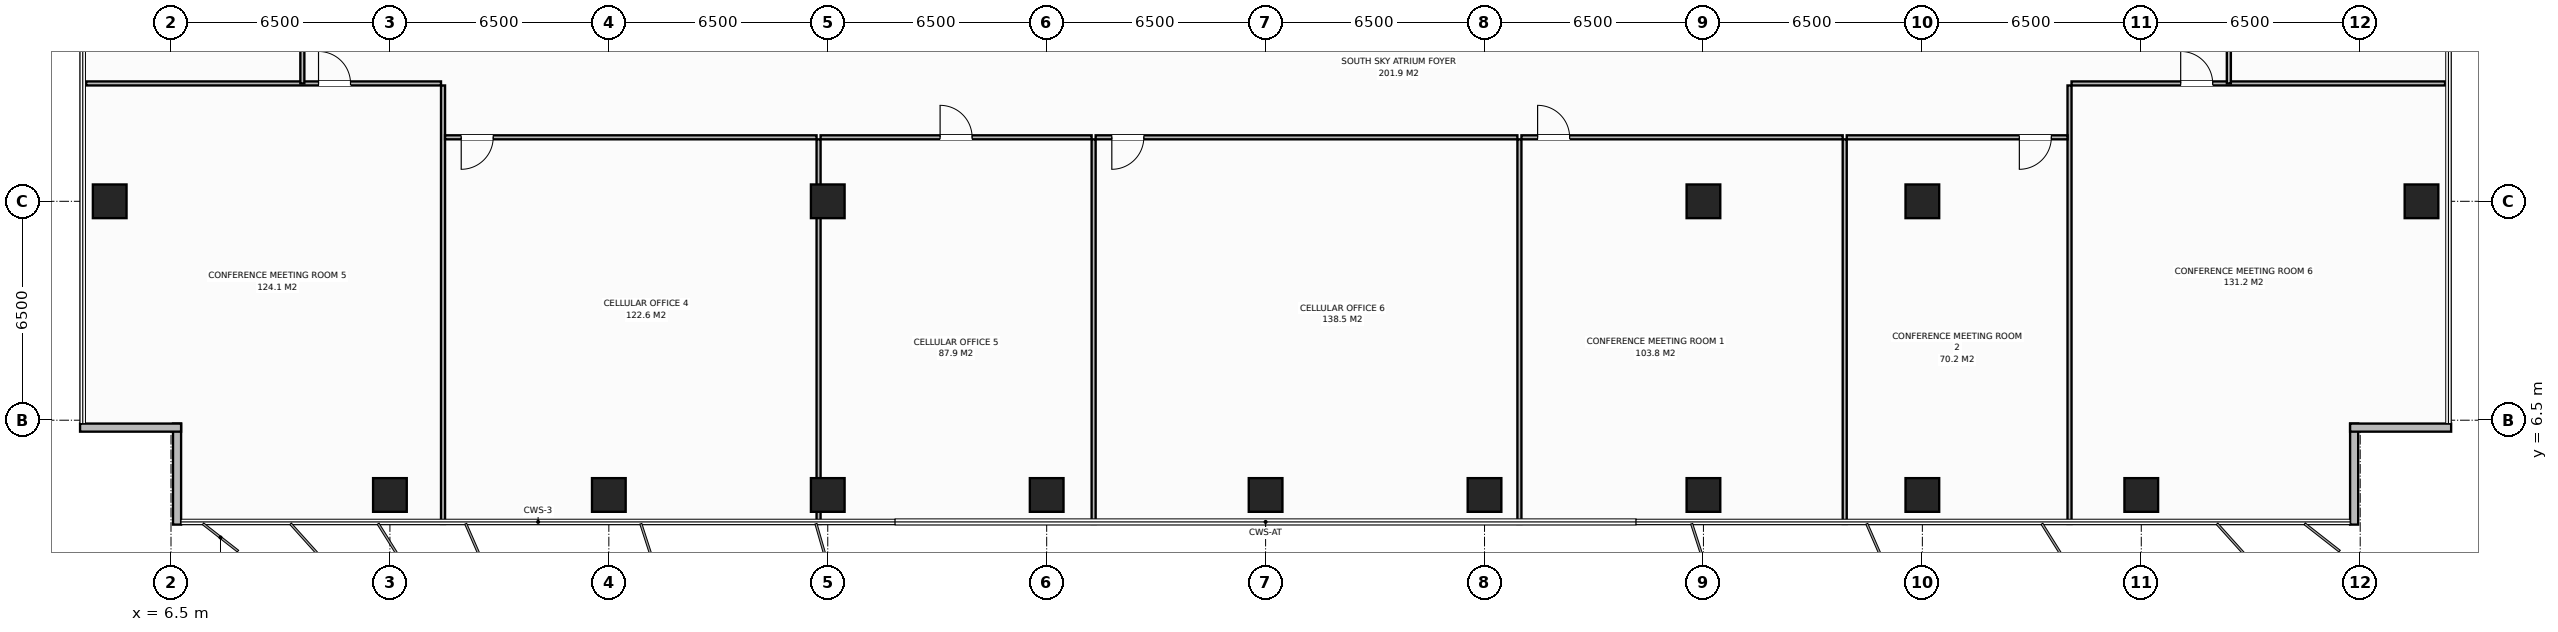
"""IFC4 building model, lengths in metres.
Left out: names, types, materials, properties, quantities, classifications, styles, units other than length and angle.
Written with IfcOpenShell. Run it as: python <this file> out.ifc"""

import sys

from ifc_helpers import new_model, si_unit, direction, frame, frame_2d, origin, origin_2d, place, context, subcontext, project, spatial, rectangle, extrude, element, fill, save


model = new_model("IFC4")
c1 = context("Model", 3, precision=1e-05, world=origin(), true_north=direction((0.0, 1.0)))
c2 = subcontext(c1, "Body", "Model", "MODEL_VIEW")
j1 = project(units=[si_unit("LENGTHUNIT", "METRE"), si_unit("PLANEANGLEUNIT", "RADIAN")], contexts=[c1])
p1 = place(None, origin())
s1 = spatial("IfcSite", under=j1, at=p1, CompositionType="ELEMENT")
p2 = place(p1, origin())
s2 = spatial("IfcBuilding", under=s1, at=p2, CompositionType="ELEMENT")
p3 = place(p2, frame((0.0, 0.0, 189.8)))
s3 = spatial("IfcBuildingStorey", under=s2, at=p3, CompositionType="ELEMENT", Elevation=189.8)
for number, where, z_axis, x_axis in (
    (1, (58.5, 13.0, 0.0), (0.0, 0.0, 1.0), (1.0, 0.0, 0.0)),
    (2, (26.0, 13.0, 0.0), (0.0, 0.0, 1.0), (1.0, 0.0, 0.0)),
    (3, (52.0, 13.0, 0.0), (0.0, 0.0, 1.0), (1.0, 0.0, 0.0)),
    (4, (13.0, 4.28, 0.0), (0.0, 0.0, 1.0), (1.0, 0.0, 0.0)),
    (5, (19.5, 4.28, 0.0), (0.0, 0.0, 1.0), (1.0, 0.0, 0.0)),
    (6, (26.0, 4.28, 0.0), (0.0, 0.0, 1.0), (1.0, 0.0, 0.0)),
    (7, (32.5, 4.28, 0.0), (0.0, 0.0, 1.0), (1.0, 0.0, 0.0)),
    (8, (39.0, 4.28, 0.0), (0.0, 0.0, 1.0), (1.0, 0.0, 0.0)),
    (9, (45.5, 4.28, 0.0), (0.0, 0.0, 1.0), (1.0, 0.0, 0.0)),
    (10, (52.0, 4.28, 0.0), (0.0, 0.0, 1.0), (1.0, 0.0, 0.0)),
    (11, (58.5, 4.28, 0.0), (0.0, 0.0, 1.0), (1.0, 0.0, 0.0)),
    (12, (65.0, 4.28, 0.0), (0.0, 0.0, 1.0), (1.0, 0.0, 0.0)),
    (13, (4.68, 13.0, 0.0), (0.0, 0.0, 1.0), (1.0, 0.0, 0.0)),
    (14, (73.32, 13.0, 0.0), (0.0, 0.0, 1.0), (1.0, 0.0, 0.0)),
):
    element("IfcColumn", number, at=place(p3, frame(where, z_axis=z_axis, x_axis=x_axis)), inside=s3, PredefinedType="COLUMN", context=c2, shape_type="SweptSolid", body=[
        extrude(rectangle(XDim=1.0, YDim=1.0, at=origin_2d()), origin(), (0.0, 0.0, 1.0), 3.8),
    ])
for number, where, z_axis, x_axis in (
    (15, (6.68, 3.4, 0.0), (0.0, 0.0, 1.0), (0.0, 1.0, 0.0)),
    (16, (6.8, 6.28, 0.0), (0.0, 0.0, 1.0), (-1.0, 0.0, 0.0)),
    (17, (71.32, 6.4, 0.0), (0.0, 0.0, 1.0), (0.0, -1.0, 0.0)),
    (18, (74.2, 6.28, 0.0), (0.0, 0.0, 1.0), (-1.0, 0.0, 0.0)),
):
    element("IfcWall", number, at=place(p3, frame(where, z_axis=z_axis, x_axis=x_axis)), inside=s3, PredefinedType="STANDARD", context=c2, shape_type="SweptSolid", body=[
        extrude(rectangle(XDim=3.0, YDim=0.24, at=frame_2d((1.5, 0.0))), origin(), (0.0, 0.0, 1.0), 3.572),
    ])
p4 = place(p3, frame((14.577, 3.42, 0.0), z_axis=(0.0, 0.0, 1.0), x_axis=(0.0, 1.0, 0.0)))
e19 = element("IfcWall", 19, at=p4, inside=s3, PredefinedType="PARTITIONING", context=c2, shape_type="SweptSolid", body=[
    extrude(rectangle(XDim=13.02, YDim=0.12, at=frame_2d((6.51, 0.0))), origin(), (0.0, 0.0, 1.0), 3.572),
])
p5 = place(p3, frame((3.98, 16.5, 0.0), z_axis=(0.0, 0.0, 1.0), x_axis=(1.0, 0.0, 0.0)))
e20 = element("IfcWall", 20, at=p5, inside=s3, PredefinedType="PARTITIONING", context=c2, shape_type="SweptSolid", body=[
    extrude(rectangle(XDim=10.537, YDim=0.12, at=frame_2d((5.269, 0.0))), origin(), (0.0, 0.0, 1.0), 3.572),
])
p6 = place(p5, frame((6.9, 0.0, 0.0)))
e21 = element("IfcOpeningElement", 21, at=p6, cuts=e20, PredefinedType="OPENING", context=c2, shape_type="SweptSolid", body=[
    extrude(rectangle(XDim=0.95, YDim=2.15, at=frame_2d((0.475, 1.075))), frame((0.0, 0.07, 0.0), z_axis=(0.0, -1.0, 0.0), x_axis=(1.0, 0.0, 0.0)), (0.0, 0.0, 1.0), 0.14),
])
p7 = place(p3, frame((25.727, 3.42, 0.0), z_axis=(0.0, 0.0, 1.0), x_axis=(0.0, 1.0, 0.0)))
e22 = element("IfcWall", 22, at=p7, inside=s3, PredefinedType="PARTITIONING", context=c2, shape_type="SweptSolid", body=[
    extrude(rectangle(XDim=11.42, YDim=0.12, at=frame_2d((5.71, 0.0))), origin(), (0.0, 0.0, 1.0), 3.572),
])
p8 = place(p3, frame((14.637, 14.9, 0.0), z_axis=(0.0, 0.0, 1.0), x_axis=(1.0, 0.0, 0.0)))
e23 = element("IfcWall", 23, at=p8, inside=s3, PredefinedType="PARTITIONING", context=c2, shape_type="SweptSolid", body=[
    extrude(rectangle(XDim=11.03, YDim=0.12, at=frame_2d((5.515, 0.0))), origin(), (0.0, 0.0, 1.0), 3.572),
])
p9 = place(p8, frame((0.48, 0.0, 0.0)))
e24 = element("IfcOpeningElement", 24, at=p9, cuts=e23, PredefinedType="OPENING", context=c2, shape_type="SweptSolid", body=[
    extrude(rectangle(XDim=0.95, YDim=2.15, at=frame_2d((0.475, 1.075))), frame((0.0, 0.07, 0.0), z_axis=(0.0, -1.0, 0.0), x_axis=(1.0, 0.0, 0.0)), (0.0, 0.0, 1.0), 0.14),
])
p10 = place(p3, frame((33.894, 3.42, 0.0), z_axis=(0.0, 0.0, 1.0), x_axis=(0.0, 1.0, 0.0)))
e25 = element("IfcWall", 25, at=p10, inside=s3, PredefinedType="PARTITIONING", context=c2, shape_type="SweptSolid", body=[
    extrude(rectangle(XDim=11.42, YDim=0.12, at=frame_2d((5.71, 0.0))), origin(), (0.0, 0.0, 1.0), 3.572),
])
p11 = place(p3, frame((25.787, 14.9, 0.0), z_axis=(0.0, 0.0, 1.0), x_axis=(1.0, 0.0, 0.0)))
e26 = element("IfcWall", 26, at=p11, inside=s3, PredefinedType="PARTITIONING", context=c2, shape_type="SweptSolid", body=[
    extrude(rectangle(XDim=8.047, YDim=0.12, at=frame_2d((4.023, 0.0))), origin(), (0.0, 0.0, 1.0), 3.572),
])
p12 = place(p11, frame((3.548, 0.0, 0.0)))
e27 = element("IfcOpeningElement", 27, at=p12, cuts=e26, PredefinedType="OPENING", context=c2, shape_type="SweptSolid", body=[
    extrude(rectangle(XDim=0.95, YDim=2.15, at=frame_2d((0.475, 1.075))), frame((0.0, 0.07, 0.0), z_axis=(0.0, -1.0, 0.0), x_axis=(1.0, 0.0, 0.0)), (0.0, 0.0, 1.0), 0.14),
])
p13 = place(p3, frame((46.536, 3.42, 0.0), z_axis=(0.0, 0.0, 1.0), x_axis=(0.0, 1.0, 0.0)))
e28 = element("IfcWall", 28, at=p13, inside=s3, PredefinedType="PARTITIONING", context=c2, shape_type="SweptSolid", body=[
    extrude(rectangle(XDim=11.42, YDim=0.12, at=frame_2d((5.71, 0.0))), origin(), (0.0, 0.0, 1.0), 3.572),
])
p14 = place(p3, frame((33.954, 14.9, 0.0), z_axis=(0.0, 0.0, 1.0), x_axis=(1.0, 0.0, 0.0)))
e29 = element("IfcWall", 29, at=p14, inside=s3, PredefinedType="PARTITIONING", context=c2, shape_type="SweptSolid", body=[
    extrude(rectangle(XDim=12.522, YDim=0.12, at=frame_2d((6.261, 0.0))), origin(), (0.0, 0.0, 1.0), 3.572),
])
p15 = place(p14, frame((0.48, 0.0, 0.0)))
e30 = element("IfcOpeningElement", 30, at=p15, cuts=e29, PredefinedType="OPENING", context=c2, shape_type="SweptSolid", body=[
    extrude(rectangle(XDim=0.95, YDim=2.15, at=frame_2d((0.475, 1.075))), frame((0.0, 0.07, 0.0), z_axis=(0.0, -1.0, 0.0), x_axis=(1.0, 0.0, 0.0)), (0.0, 0.0, 1.0), 0.14),
])
p16 = place(p3, frame((56.195, 3.42, 0.0), z_axis=(0.0, 0.0, 1.0), x_axis=(0.0, 1.0, 0.0)))
e31 = element("IfcWall", 31, at=p16, inside=s3, PredefinedType="PARTITIONING", context=c2, shape_type="SweptSolid", body=[
    extrude(rectangle(XDim=11.42, YDim=0.12, at=frame_2d((5.71, 0.0))), origin(), (0.0, 0.0, 1.0), 3.572),
])
p17 = place(p3, frame((46.596, 14.9, 0.0), z_axis=(0.0, 0.0, 1.0), x_axis=(1.0, 0.0, 0.0)))
e32 = element("IfcWall", 32, at=p17, inside=s3, PredefinedType="PARTITIONING", context=c2, shape_type="SweptSolid", body=[
    extrude(rectangle(XDim=9.539, YDim=0.12, at=frame_2d((4.769, 0.0))), origin(), (0.0, 0.0, 1.0), 3.572),
])
p18 = place(p17, frame((0.48, 0.0, 0.0)))
e33 = element("IfcOpeningElement", 33, at=p18, cuts=e32, PredefinedType="OPENING", context=c2, shape_type="SweptSolid", body=[
    extrude(rectangle(XDim=0.95, YDim=2.15, at=frame_2d((0.475, 1.075))), frame((0.0, 0.07, 0.0), z_axis=(0.0, -1.0, 0.0), x_axis=(1.0, 0.0, 0.0)), (0.0, 0.0, 1.0), 0.14),
])
p19 = place(p3, frame((62.87, 3.42, 0.0), z_axis=(0.0, 0.0, 1.0), x_axis=(0.0, 1.0, 0.0)))
e34 = element("IfcWall", 34, at=p19, inside=s3, PredefinedType="PARTITIONING", context=c2, shape_type="SweptSolid", body=[
    extrude(rectangle(XDim=13.02, YDim=0.12, at=frame_2d((6.51, 0.0))), origin(), (0.0, 0.0, 1.0), 3.572),
])
p20 = place(p3, frame((56.255, 14.9, 0.0), z_axis=(0.0, 0.0, 1.0), x_axis=(1.0, 0.0, 0.0)))
e35 = element("IfcWall", 35, at=p20, inside=s3, PredefinedType="PARTITIONING", context=c2, shape_type="SweptSolid", body=[
    extrude(rectangle(XDim=6.555, YDim=0.12, at=frame_2d((3.277, 0.0))), origin(), (0.0, 0.0, 1.0), 3.572),
])
p21 = place(p20, frame((5.125, 0.0, 0.0)))
e36 = element("IfcOpeningElement", 36, at=p21, cuts=e35, PredefinedType="OPENING", context=c2, shape_type="SweptSolid", body=[
    extrude(rectangle(XDim=0.95, YDim=2.15, at=frame_2d((0.475, 1.075))), frame((0.0, 0.07, 0.0), z_axis=(0.0, -1.0, 0.0), x_axis=(1.0, 0.0, 0.0)), (0.0, 0.0, 1.0), 0.14),
])
p22 = place(p3, frame((62.93, 16.5, 0.0), z_axis=(0.0, 0.0, 1.0), x_axis=(1.0, 0.0, 0.0)))
e37 = element("IfcWall", 37, at=p22, inside=s3, PredefinedType="PARTITIONING", context=c2, shape_type="SweptSolid", body=[
    extrude(rectangle(XDim=11.09, YDim=0.12, at=frame_2d((5.545, 0.0))), origin(), (0.0, 0.0, 1.0), 3.572),
])
p23 = place(p22, frame((3.24, 0.0, 0.0)))
e38 = element("IfcOpeningElement", 38, at=p23, cuts=e37, PredefinedType="OPENING", context=c2, shape_type="SweptSolid", body=[
    extrude(rectangle(XDim=0.95, YDim=2.15, at=frame_2d((0.475, 1.075))), frame((0.0, 0.07, 0.0), z_axis=(0.0, -1.0, 0.0), x_axis=(1.0, 0.0, 0.0)), (0.0, 0.0, 1.0), 0.14),
])
p24 = place(p3, frame((10.4, 16.5, 0.0), z_axis=(0.0, 0.0, 1.0), x_axis=(0.0, 1.0, 0.0)))
e39 = element("IfcWall", 39, at=p24, inside=s3, PredefinedType="PARTITIONING", context=c2, shape_type="SweptSolid", body=[
    extrude(rectangle(XDim=6.333, YDim=0.12, at=frame_2d((3.167, 0.0))), origin(), (0.0, 0.0, 1.0), 3.572),
])
p25 = place(p24, frame((3.742, 0.0, 0.0)))
e40 = element("IfcOpeningElement", 40, at=p25, cuts=e39, PredefinedType="OPENING", context=c2, shape_type="SweptSolid", body=[
    extrude(rectangle(XDim=0.95, YDim=2.15, at=frame_2d((0.475, 1.075))), frame((0.0, 0.07, 0.0), z_axis=(0.0, -1.0, 0.0), x_axis=(1.0, 0.0, 0.0)), (0.0, 0.0, 1.0), 0.14),
])
p26 = place(p3, frame((67.6, 16.5, 0.0), z_axis=(0.0, 0.0, 1.0), x_axis=(0.0, 1.0, 0.0)))
e41 = element("IfcWall", 41, at=p26, inside=s3, PredefinedType="PARTITIONING", context=c2, shape_type="SweptSolid", body=[
    extrude(rectangle(XDim=16.9, YDim=0.12, at=frame_2d((8.45, 0.0))), origin(), (0.0, 0.0, 1.0), 3.572),
])
p27 = place(p26, frame((9.025, 0.0, 0.0)))
e42 = element("IfcOpeningElement", 42, at=p27, cuts=e41, PredefinedType="OPENING", context=c2, shape_type="SweptSolid", body=[
    extrude(rectangle(XDim=0.95, YDim=2.15, at=frame_2d((0.475, 1.075))), frame((0.0, 0.07, 0.0), z_axis=(0.0, -1.0, 0.0), x_axis=(1.0, 0.0, 0.0)), (0.0, 0.0, 1.0), 0.14),
])
p28 = place(p6, origin())
e43 = element("IfcDoor", 43, at=p28, inside=s3, OperationType="SINGLE_SWING_LEFT", PredefinedType="DOOR", context=c2, shape_type="SweptSolid", body=[
    extrude(rectangle(XDim=0.95, YDim=2.15, at=frame_2d((0.475, 1.075))), frame((0.0, 0.025, 0.0), z_axis=(0.0, -1.0, 0.0), x_axis=(1.0, 0.0, 0.0)), (0.0, 0.0, 1.0), 0.05),
])
fill(e21, e43)
p29 = place(p9, origin())
e44 = element("IfcDoor", 44, at=p29, inside=s3, OperationType="SINGLE_SWING_RIGHT", PredefinedType="DOOR", context=c2, shape_type="SweptSolid", body=[
    extrude(rectangle(XDim=0.95, YDim=2.15, at=frame_2d((0.475, 1.075))), frame((0.0, 0.025, 0.0), z_axis=(0.0, -1.0, 0.0), x_axis=(1.0, 0.0, 0.0)), (0.0, 0.0, 1.0), 0.05),
])
fill(e24, e44)
p30 = place(p12, origin())
e45 = element("IfcDoor", 45, at=p30, inside=s3, OperationType="SINGLE_SWING_LEFT", PredefinedType="DOOR", context=c2, shape_type="SweptSolid", body=[
    extrude(rectangle(XDim=0.95, YDim=2.15, at=frame_2d((0.475, 1.075))), frame((0.0, 0.025, 0.0), z_axis=(0.0, -1.0, 0.0), x_axis=(1.0, 0.0, 0.0)), (0.0, 0.0, 1.0), 0.05),
])
fill(e27, e45)
p31 = place(p15, origin())
e46 = element("IfcDoor", 46, at=p31, inside=s3, OperationType="SINGLE_SWING_RIGHT", PredefinedType="DOOR", context=c2, shape_type="SweptSolid", body=[
    extrude(rectangle(XDim=0.95, YDim=2.15, at=frame_2d((0.475, 1.075))), frame((0.0, 0.025, 0.0), z_axis=(0.0, -1.0, 0.0), x_axis=(1.0, 0.0, 0.0)), (0.0, 0.0, 1.0), 0.05),
])
fill(e30, e46)
p32 = place(p18, origin())
e47 = element("IfcDoor", 47, at=p32, inside=s3, OperationType="SINGLE_SWING_LEFT", PredefinedType="DOOR", context=c2, shape_type="SweptSolid", body=[
    extrude(rectangle(XDim=0.95, YDim=2.15, at=frame_2d((0.475, 1.075))), frame((0.0, 0.025, 0.0), z_axis=(0.0, -1.0, 0.0), x_axis=(1.0, 0.0, 0.0)), (0.0, 0.0, 1.0), 0.05),
])
fill(e33, e47)
p33 = place(p21, origin())
e48 = element("IfcDoor", 48, at=p33, inside=s3, OperationType="SINGLE_SWING_RIGHT", PredefinedType="DOOR", context=c2, shape_type="SweptSolid", body=[
    extrude(rectangle(XDim=0.95, YDim=2.15, at=frame_2d((0.475, 1.075))), frame((0.0, 0.025, 0.0), z_axis=(0.0, -1.0, 0.0), x_axis=(1.0, 0.0, 0.0)), (0.0, 0.0, 1.0), 0.05),
])
fill(e36, e48)
p34 = place(p23, origin())
e49 = element("IfcDoor", 49, at=p34, inside=s3, OperationType="SINGLE_SWING_LEFT", PredefinedType="DOOR", context=c2, shape_type="SweptSolid", body=[
    extrude(rectangle(XDim=0.95, YDim=2.15, at=frame_2d((0.475, 1.075))), frame((0.0, 0.025, 0.0), z_axis=(0.0, -1.0, 0.0), x_axis=(1.0, 0.0, 0.0)), (0.0, 0.0, 1.0), 0.05),
])
fill(e38, e49)
save(model, sys.argv[1])
